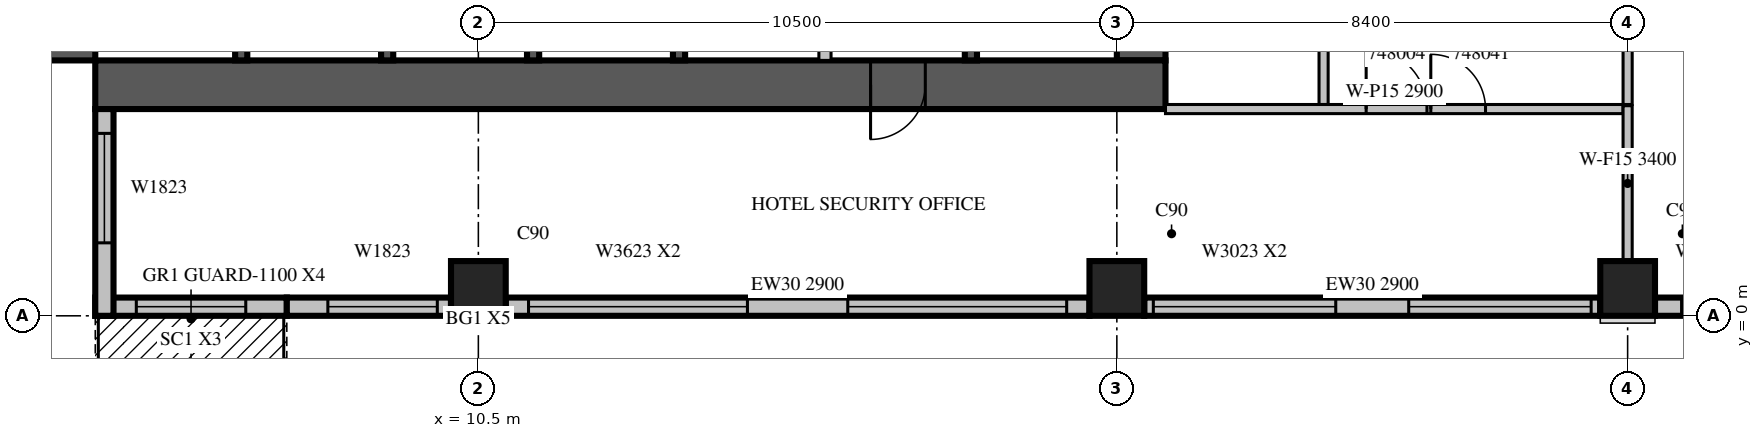
"""IFC4 building model, lengths in metres.
Left out: names, types, materials, properties, quantities, classifications, styles, units other than length and angle.
Written with IfcOpenShell. Run it as: python <this file> out.ifc"""

import sys

from ifc_helpers import new_model, si_unit, direction, frame, frame_2d, origin, origin_2d, place, context, subcontext, project, spatial, rectangle, extrude, source, transform, mapped, element, fill, save


model = new_model("IFC4")
c1 = context("Model", 3, precision=1e-05, world=origin(), true_north=direction((0.0, 1.0)))
c2 = subcontext(c1, "Body", "Model", "MODEL_VIEW")
j1 = project(units=[si_unit("LENGTHUNIT", "METRE"), si_unit("PLANEANGLEUNIT", "RADIAN")], contexts=[c1])
p1 = place(None, origin())
s1 = spatial("IfcSite", under=j1, at=p1, CompositionType="ELEMENT")
p2 = place(p1, origin())
s2 = spatial("IfcBuilding", under=s1, at=p2, CompositionType="ELEMENT")
p3 = place(p2, frame((0.0, 0.0, 215.8)))
s3 = spatial("IfcBuildingStorey", under=s2, at=p3, CompositionType="ELEMENT", Elevation=215.8)
m1 = source(origin(), c2, "Body", "SweptSolid", [
    extrude(rectangle(XDim=0.9, YDim=0.9, at=origin_2d()), origin(), (0.0, 0.0, 1.0), 3.8),
])
for number, where, z_axis, x_axis in (
    (1, (10.5, 0.45, 0.0), (0.0, 0.0, 1.0), (1.0, 0.0, 0.0)),
    (2, (21.0, 0.45, 0.0), (0.0, 0.0, 1.0), (1.0, 0.0, 0.0)),
    (3, (29.4, 0.45, 0.0), (0.0, 0.0, 1.0), (1.0, 0.0, 0.0)),
):
    element("IfcColumn", number, at=place(p3, frame(where, z_axis=z_axis, x_axis=x_axis)), inside=s3, PredefinedType="COLUMN", context=c2, shape_type="MappedRepresentation", body=[
        mapped(m1, transform((0.0, 0.0, 0.0), scale=1.0)),
    ])
m2 = source(origin(), c2, "Body", "SweptSolid", [
    extrude(rectangle(XDim=17.6, YDim=0.8, at=frame_2d((8.8, 0.0))), origin(), (0.0, 0.0, 1.0), 3.8),
])
p4 = place(p3, frame((3.8, 4.2, 0.0), z_axis=(0.0, 0.0, 1.0), x_axis=(0.0, 1.0, 0.0)))
e4 = element("IfcWall", 4, at=p4, inside=s3, PredefinedType="SHEAR", context=c2, shape_type="MappedRepresentation", body=[
    mapped(m2, transform((0.0, 0.0, 0.0), scale=1.0)),
])
m3 = source(origin(), c2, "Body", "SweptSolid", [
    extrude(rectangle(XDim=2.2, YDim=2.1, at=frame_2d((1.1, 1.05))), frame((0.0, 0.41, 0.0), z_axis=(0.0, -1.0, 0.0), x_axis=(1.0, 0.0, 0.0)), (0.0, 0.0, 1.0), 0.82),
])
p5 = place(p4, frame((4.2, 0.0, 0.0)))
e5 = element("IfcOpeningElement", 5, at=p5, cuts=e4, PredefinedType="OPENING", context=c2, shape_type="MappedRepresentation", body=[
    mapped(m3, transform((0.0, 0.0, 0.0), scale=1.0)),
])
m4 = source(origin(), c2, "Body", "SweptSolid", [
    extrude(rectangle(XDim=0.9, YDim=2.1, at=frame_2d((0.45, 1.05))), frame((0.0, 0.41, 0.0), z_axis=(0.0, -1.0, 0.0), x_axis=(1.0, 0.0, 0.0)), (0.0, 0.0, 1.0), 0.82),
])
p6 = place(p4, frame((10.95, 0.0, 0.0)))
e6 = element("IfcOpeningElement", 6, at=p6, cuts=e4, PredefinedType="OPENING", context=c2, shape_type="MappedRepresentation", body=[
    mapped(m4, transform((0.0, 0.0, 0.0), scale=1.0)),
])
m5 = source(origin(), c2, "Body", "SweptSolid", [
    extrude(rectangle(XDim=16.8, YDim=0.8, at=frame_2d((8.4, 0.0))), origin(), (0.0, 0.0, 1.0), 3.8),
])
p7 = place(p3, frame((21.4, 4.2, 0.0), z_axis=(0.0, 0.0, 1.0), x_axis=(0.0, 1.0, 0.0)))
e7 = element("IfcWall", 7, at=p7, inside=s3, PredefinedType="SHEAR", context=c2, shape_type="MappedRepresentation", body=[
    mapped(m5, transform((0.0, 0.0, 0.0), scale=1.0)),
])
p8 = place(p7, frame((4.2, 0.0, 0.0)))
e8 = element("IfcOpeningElement", 8, at=p8, cuts=e7, PredefinedType="OPENING", context=c2, shape_type="MappedRepresentation", body=[
    mapped(m3, transform((0.0, 0.0, 0.0), scale=1.0)),
])
m6 = source(origin(), c2, "Body", "SweptSolid", [
    extrude(rectangle(XDim=1.2, YDim=2.1, at=frame_2d((0.6, 1.05))), frame((0.0, 0.41, 0.0), z_axis=(0.0, -1.0, 0.0), x_axis=(1.0, 0.0, 0.0)), (0.0, 0.0, 1.0), 0.82),
])
p9 = place(p7, frame((14.7, 0.0, 0.0)))
e9 = element("IfcOpeningElement", 9, at=p9, cuts=e7, PredefinedType="OPENING", context=c2, shape_type="MappedRepresentation", body=[
    mapped(m6, transform((0.0, 0.0, 0.0), scale=1.0)),
])
p10 = place(p3, frame((4.2, 3.8, 0.0), z_axis=(0.0, 0.0, 1.0), x_axis=(1.0, 0.0, 0.0)))
e10 = element("IfcWall", 10, at=p10, inside=s3, PredefinedType="SHEAR", context=c2, shape_type="MappedRepresentation", body=[
    mapped(m2, transform((0.0, 0.0, 0.0), scale=1.0)),
])
p11 = place(p10, frame((12.75, 0.0, 0.0)))
e11 = element("IfcOpeningElement", 11, at=p11, cuts=e10, PredefinedType="OPENING", context=c2, shape_type="MappedRepresentation", body=[
    mapped(m4, transform((0.0, 0.0, 0.0), scale=1.0)),
])
m7 = source(origin(), c2, "Body", "SweptSolid", [
    extrude(rectangle(XDim=3.15, YDim=0.3, at=frame_2d((1.575, 0.0))), origin(), (0.0, 0.0, 1.0), 3.4),
])
p12 = place(p3, frame((4.2, 0.15, 0.0), z_axis=(0.0, 0.0, 1.0), x_axis=(1.0, 0.0, 0.0)))
e12 = element("IfcWall", 12, at=p12, inside=s3, PredefinedType="STANDARD", context=c2, shape_type="MappedRepresentation", body=[
    mapped(m7, transform((0.0, 0.0, 0.0), scale=1.0)),
])
m8 = source(origin(), c2, "Body", "SweptSolid", [
    extrude(rectangle(XDim=1.8, YDim=2.4, at=frame_2d((0.9, 1.2))), frame((0.0, 0.16, 0.0), z_axis=(0.0, -1.0, 0.0), x_axis=(1.0, 0.0, 0.0)), (0.0, 0.0, 1.0), 0.32),
])
p13 = place(p12, frame((0.675, 0.0, 0.0)))
e13 = element("IfcOpeningElement", 13, at=p13, cuts=e12, PredefinedType="OPENING", context=c2, shape_type="MappedRepresentation", body=[
    mapped(m8, transform((0.0, 0.0, 0.0), scale=1.0)),
])
m9 = source(origin(), c2, "Body", "SweptSolid", [
    extrude(rectangle(XDim=2.7, YDim=0.3, at=frame_2d((1.35, 0.0))), origin(), (0.0, 0.0, 1.0), 3.4),
])
p14 = place(p3, frame((7.35, 0.15, 0.0), z_axis=(0.0, 0.0, 1.0), x_axis=(1.0, 0.0, 0.0)))
e14 = element("IfcWall", 14, at=p14, inside=s3, PredefinedType="STANDARD", context=c2, shape_type="MappedRepresentation", body=[
    mapped(m9, transform((0.0, 0.0, 0.0), scale=1.0)),
])
m10 = source(origin(), c2, "Body", "SweptSolid", [
    extrude(rectangle(XDim=1.8, YDim=2.3, at=frame_2d((0.9, 1.15))), frame((0.0, 0.16, 0.0), z_axis=(0.0, -1.0, 0.0), x_axis=(1.0, 0.0, 0.0)), (0.0, 0.0, 1.0), 0.32),
])
p15 = place(p14, frame((0.675, 0.0, 0.6)))
e15 = element("IfcOpeningElement", 15, at=p15, cuts=e14, PredefinedType="OPENING", context=c2, shape_type="MappedRepresentation", body=[
    mapped(m10, transform((0.0, 0.0, 0.0), scale=1.0)),
])
m11 = source(origin(), c2, "Body", "SweptSolid", [
    extrude(rectangle(XDim=9.6, YDim=0.3, at=frame_2d((4.8, 0.0))), origin(), (0.0, 0.0, 1.0), 2.9),
])
p16 = place(p3, frame((10.95, 0.15, 0.0), z_axis=(0.0, 0.0, 1.0), x_axis=(1.0, 0.0, 0.0)))
e16 = element("IfcWall", 16, at=p16, inside=s3, PredefinedType="STANDARD", context=c2, shape_type="MappedRepresentation", body=[
    mapped(m11, transform((0.0, 0.0, 0.0), scale=1.0)),
])
m12 = source(origin(), c2, "Body", "SweptSolid", [
    extrude(rectangle(XDim=3.6, YDim=2.3, at=frame_2d((1.8, 1.15))), frame((0.0, 0.16, 0.0), z_axis=(0.0, -1.0, 0.0), x_axis=(1.0, 0.0, 0.0)), (0.0, 0.0, 1.0), 0.32),
])
p17 = place(p16, frame((0.375, 0.0, 0.6)))
e17 = element("IfcOpeningElement", 17, at=p17, cuts=e16, PredefinedType="OPENING", context=c2, shape_type="MappedRepresentation", body=[
    mapped(m12, transform((0.0, 0.0, 0.0), scale=1.0)),
])
p18 = place(p16, frame((5.625, 0.0, 0.6)))
e18 = element("IfcOpeningElement", 18, at=p18, cuts=e16, PredefinedType="OPENING", context=c2, shape_type="MappedRepresentation", body=[
    mapped(m12, transform((0.0, 0.0, 0.0), scale=1.0)),
])
m13 = source(origin(), c2, "Body", "SweptSolid", [
    extrude(rectangle(XDim=7.5, YDim=0.3, at=frame_2d((3.75, 0.0))), origin(), (0.0, 0.0, 1.0), 2.9),
])
p19 = place(p3, frame((21.45, 0.15, 0.0), z_axis=(0.0, 0.0, 1.0), x_axis=(1.0, 0.0, 0.0)))
e19 = element("IfcWall", 19, at=p19, inside=s3, PredefinedType="STANDARD", context=c2, shape_type="MappedRepresentation", body=[
    mapped(m13, transform((0.0, 0.0, 0.0), scale=1.0)),
])
m14 = source(origin(), c2, "Body", "SweptSolid", [
    extrude(rectangle(XDim=3.0, YDim=2.3, at=frame_2d((1.5, 1.15))), frame((0.0, 0.16, 0.0), z_axis=(0.0, -1.0, 0.0), x_axis=(1.0, 0.0, 0.0)), (0.0, 0.0, 1.0), 0.32),
])
p20 = place(p19, frame((0.15, 0.0, 0.6)))
e20 = element("IfcOpeningElement", 20, at=p20, cuts=e19, PredefinedType="OPENING", context=c2, shape_type="MappedRepresentation", body=[
    mapped(m14, transform((0.0, 0.0, 0.0), scale=1.0)),
])
p21 = place(p19, frame((4.35, 0.0, 0.6)))
e21 = element("IfcOpeningElement", 21, at=p21, cuts=e19, PredefinedType="OPENING", context=c2, shape_type="MappedRepresentation", body=[
    mapped(m14, transform((0.0, 0.0, 0.0), scale=1.0)),
])
m15 = source(origin(), c2, "Body", "SweptSolid", [
    extrude(rectangle(XDim=7.5, YDim=0.3, at=frame_2d((3.75, 0.0))), origin(), (0.0, 0.0, 1.0), 3.4),
])
p22 = place(p3, frame((29.85, 0.15, 0.0), z_axis=(0.0, 0.0, 1.0), x_axis=(1.0, 0.0, 0.0)))
e22 = element("IfcWall", 22, at=p22, inside=s3, PredefinedType="STANDARD", context=c2, shape_type="MappedRepresentation", body=[
    mapped(m15, transform((0.0, 0.0, 0.0), scale=1.0)),
])
m16 = source(origin(), c2, "Body", "SweptSolid", [
    extrude(rectangle(XDim=1.2, YDim=2.3, at=frame_2d((0.6, 1.15))), frame((0.0, 0.16, 0.0), z_axis=(0.0, -1.0, 0.0), x_axis=(1.0, 0.0, 0.0)), (0.0, 0.0, 1.0), 0.32),
])
p23 = place(p22, frame((0.438, 0.0, 0.6)))
e23 = element("IfcOpeningElement", 23, at=p23, cuts=e22, PredefinedType="OPENING", context=c2, shape_type="MappedRepresentation", body=[
    mapped(m16, transform((0.0, 0.0, 0.0), scale=1.0)),
])
p24 = place(p22, frame((5.963, 0.0, 0.6)))
e24 = element("IfcOpeningElement", 24, at=p24, cuts=e22, PredefinedType="OPENING", context=c2, shape_type="MappedRepresentation", body=[
    mapped(m16, transform((0.0, 0.0, 0.0), scale=1.0)),
])
m17 = source(origin(), c2, "Body", "SweptSolid", [
    extrude(rectangle(XDim=3.4, YDim=0.3, at=frame_2d((1.7, 0.0))), origin(), (0.0, 0.0, 1.0), 3.4),
])
p25 = place(p3, frame((4.35, 3.4, 0.0), z_axis=(0.0, 0.0, 1.0), x_axis=(0.0, -1.0, 0.0)))
e25 = element("IfcWall", 25, at=p25, inside=s3, PredefinedType="STANDARD", context=c2, shape_type="MappedRepresentation", body=[
    mapped(m17, transform((0.0, 0.0, 0.0), scale=1.0)),
])
p26 = place(p25, frame((0.4, 0.0, 0.6)))
e26 = element("IfcOpeningElement", 26, at=p26, cuts=e25, PredefinedType="OPENING", context=c2, shape_type="MappedRepresentation", body=[
    mapped(m10, transform((0.0, 0.0, 0.0), scale=1.0)),
])
m18 = source(origin(), c2, "Body", "SweptSolid", [
    extrude(rectangle(XDim=3.1, YDim=0.2, at=frame_2d((1.55, 0.0))), origin(), (0.0, 0.0, 1.0), 3.8),
])
for number, where, z_axis, x_axis in (
    (27, (6.6, 4.2, 0.0), (0.0, 0.0, 1.0), (0.0, 1.0, 0.0)),
    (28, (9.0, 4.2, 0.0), (0.0, 0.0, 1.0), (0.0, 1.0, 0.0)),
    (29, (11.4, 4.2, 0.0), (0.0, 0.0, 1.0), (0.0, 1.0, 0.0)),
):
    element("IfcWall", number, at=place(p3, frame(where, z_axis=z_axis, x_axis=x_axis)), inside=s3, PredefinedType="SOLIDWALL", context=c2, shape_type="MappedRepresentation", body=[
        mapped(m18, transform((0.0, 0.0, 0.0), scale=1.0)),
    ])
m19 = source(origin(), c2, "Body", "SweptSolid", [
    extrude(rectangle(XDim=3.1, YDim=0.2, at=frame_2d((1.55, 0.0))), origin(), (0.0, 0.0, 1.0), 3.4),
])
for number, where, z_axis, x_axis in (
    (30, (13.8, 4.2, 0.0), (0.0, 0.0, 1.0), (0.0, 1.0, 0.0)),
    (31, (18.6, 4.2, 0.0), (0.0, 0.0, 1.0), (0.0, 1.0, 0.0)),
):
    element("IfcWall", number, at=place(p3, frame(where, z_axis=z_axis, x_axis=x_axis)), inside=s3, PredefinedType="SOLIDWALL", context=c2, shape_type="MappedRepresentation", body=[
        mapped(m19, transform((0.0, 0.0, 0.0), scale=1.0)),
    ])
m20 = source(origin(), c2, "Body", "SweptSolid", [
    extrude(rectangle(XDim=3.1, YDim=0.2, at=frame_2d((1.55, 0.0))), origin(), (0.0, 0.0, 1.0), 3.4),
])
p27 = place(p3, frame((16.2, 4.2, 0.0), z_axis=(0.0, 0.0, 1.0), x_axis=(0.0, 1.0, 0.0)))
e32 = element("IfcWall", 32, at=p27, inside=s3, PredefinedType="PARTITIONING", context=c2, shape_type="MappedRepresentation", body=[
    mapped(m20, transform((0.0, 0.0, 0.0), scale=1.0)),
])
m21 = source(origin(), c2, "Body", "SweptSolid", [
    extrude(rectangle(XDim=11.225, YDim=0.15, at=frame_2d((5.612, 0.0))), origin(), (0.0, 0.0, 1.0), 2.4),
])
p28 = place(p3, frame((24.4, 14.7, 0.0), z_axis=(0.0, 0.0, 1.0), x_axis=(0.0, -1.0, 0.0)))
e33 = element("IfcWall", 33, at=p28, inside=s3, PredefinedType="PARTITIONING", context=c2, shape_type="MappedRepresentation", body=[
    mapped(m21, transform((0.0, 0.0, 0.0), scale=1.0)),
])
m22 = source(origin(), c2, "Body", "SweptSolid", [
    extrude(rectangle(XDim=0.9, YDim=2.1, at=frame_2d((0.45, 1.05))), frame((0.0, 0.085, 0.0), z_axis=(0.0, -1.0, 0.0), x_axis=(1.0, 0.0, 0.0)), (0.0, 0.0, 1.0), 0.17),
])
p29 = place(p28, frame((9.062, 0.0, 0.0)))
e34 = element("IfcOpeningElement", 34, at=p29, cuts=e33, PredefinedType="OPENING", context=c2, shape_type="MappedRepresentation", body=[
    mapped(m22, transform((0.0, 0.0, 0.0), scale=1.0)),
])
p30 = place(p28, frame((2.575, 0.0, 0.0)))
e35 = element("IfcOpeningElement", 35, at=p30, cuts=e33, PredefinedType="OPENING", context=c2, shape_type="MappedRepresentation", body=[
    mapped(m22, transform((0.0, 0.0, 0.0), scale=1.0)),
])
m23 = source(origin(), c2, "Body", "SweptSolid", [
    extrude(rectangle(XDim=6.576, YDim=0.15, at=frame_2d((3.288, 0.0))), origin(), (0.0, 0.0, 1.0), 3.4),
])
p31 = place(p3, frame((29.4, 3.475, 0.0), z_axis=(0.0, 0.0, 1.0), x_axis=(0.0, 1.0, 0.0)))
e36 = element("IfcWall", 36, at=p31, inside=s3, PredefinedType="PARTITIONING", context=c2, shape_type="MappedRepresentation", body=[
    mapped(m23, transform((0.0, 0.0, 0.0), scale=1.0)),
])
m24 = source(origin(), c2, "Body", "SweptSolid", [
    extrude(rectangle(XDim=7.525, YDim=0.15, at=frame_2d((3.763, 0.0))), origin(), (0.0, 0.0, 1.0), 2.9),
])
p32 = place(p3, frame((21.8, 3.4, 0.0), z_axis=(0.0, 0.0, 1.0), x_axis=(1.0, 0.0, 0.0)))
e37 = element("IfcWall", 37, at=p32, inside=s3, PredefinedType="PARTITIONING", context=c2, shape_type="MappedRepresentation", body=[
    mapped(m24, transform((0.0, 0.0, 0.0), scale=1.0)),
])
m25 = source(origin(), c2, "Body", "SweptSolid", [
    extrude(rectangle(XDim=1.0, YDim=2.1, at=frame_2d((0.5, 1.05))), frame((0.0, 0.085, 0.0), z_axis=(0.0, -1.0, 0.0), x_axis=(1.0, 0.0, 0.0)), (0.0, 0.0, 1.0), 0.17),
])
p33 = place(p32, frame((3.3, 0.0, 0.0)))
e38 = element("IfcOpeningElement", 38, at=p33, cuts=e37, PredefinedType="OPENING", context=c2, shape_type="MappedRepresentation", body=[
    mapped(m25, transform((0.0, 0.0, 0.0), scale=1.0)),
])
p34 = place(p32, frame((4.363, 0.0, 0.0)))
e39 = element("IfcOpeningElement", 39, at=p34, cuts=e37, PredefinedType="OPENING", context=c2, shape_type="MappedRepresentation", body=[
    mapped(m22, transform((0.0, 0.0, 0.0), scale=1.0)),
])
m26 = source(origin(), c2, "Body", "SweptSolid", [
    extrude(rectangle(XDim=2.556, YDim=0.15, at=frame_2d((1.278, 0.0))), origin(), (0.0, 0.0, 1.0), 3.4),
])
p35 = place(p3, frame((29.4, 0.899, 0.0), z_axis=(0.0, 0.0, 1.0), x_axis=(0.0, 1.0, 0.0)))
e40 = element("IfcWall", 40, at=p35, inside=s3, PredefinedType="PARTITIONING", context=c2, shape_type="MappedRepresentation", body=[
    mapped(m26, transform((0.0, 0.0, 0.0), scale=1.0)),
])
m27 = source(origin(), c2, "Body", "SweptSolid", [
    extrude(rectangle(XDim=1.8, YDim=2.4, at=frame_2d((0.9, 1.2))), frame((0.0, 0.025, 0.0), z_axis=(0.0, -1.0, 0.0), x_axis=(1.0, 0.0, 0.0)), (0.0, 0.0, 1.0), 0.05),
])
p36 = place(p13, origin())
e41 = element("IfcDoor", 41, at=p36, inside=s3, OperationType="SLIDING_TO_LEFT", PredefinedType="DOOR", context=c2, shape_type="MappedRepresentation", body=[
    mapped(m27, transform((0.0, 0.0, 0.0), scale=1.0)),
])
fill(e13, e41)
m28 = source(origin(), c2, "Body", "SweptSolid", [
    extrude(rectangle(XDim=1.8, YDim=2.3, at=frame_2d((0.9, 1.15))), frame((0.0, 0.03, 0.0), z_axis=(0.0, -1.0, 0.0), x_axis=(1.0, 0.0, 0.0)), (0.0, 0.0, 1.0), 0.06),
])
p37 = place(p15, origin())
e42 = element("IfcWindow", 42, at=p37, inside=s3, PartitioningType="SINGLE_PANEL", PredefinedType="WINDOW", context=c2, shape_type="MappedRepresentation", body=[
    mapped(m28, transform((0.0, 0.0, 0.0), scale=1.0)),
])
fill(e15, e42)
m29 = source(origin(), c2, "Body", "SweptSolid", [
    extrude(rectangle(XDim=3.6, YDim=2.3, at=frame_2d((1.8, 1.15))), frame((0.0, 0.03, 0.0), z_axis=(0.0, -1.0, 0.0), x_axis=(1.0, 0.0, 0.0)), (0.0, 0.0, 1.0), 0.06),
])
p38 = place(p17, origin())
e43 = element("IfcWindow", 43, at=p38, inside=s3, PartitioningType="SINGLE_PANEL", PredefinedType="WINDOW", context=c2, shape_type="MappedRepresentation", body=[
    mapped(m29, transform((0.0, 0.0, 0.0), scale=1.0)),
])
fill(e17, e43)
p39 = place(p18, origin())
e44 = element("IfcWindow", 44, at=p39, inside=s3, PartitioningType="SINGLE_PANEL", PredefinedType="WINDOW", context=c2, shape_type="MappedRepresentation", body=[
    mapped(m29, transform((0.0, 0.0, 0.0), scale=1.0)),
])
fill(e18, e44)
m30 = source(origin(), c2, "Body", "SweptSolid", [
    extrude(rectangle(XDim=3.0, YDim=2.3, at=frame_2d((1.5, 1.15))), frame((0.0, 0.03, 0.0), z_axis=(0.0, -1.0, 0.0), x_axis=(1.0, 0.0, 0.0)), (0.0, 0.0, 1.0), 0.06),
])
p40 = place(p20, origin())
e45 = element("IfcWindow", 45, at=p40, inside=s3, PartitioningType="SINGLE_PANEL", PredefinedType="WINDOW", context=c2, shape_type="MappedRepresentation", body=[
    mapped(m30, transform((0.0, 0.0, 0.0), scale=1.0)),
])
fill(e20, e45)
p41 = place(p21, origin())
e46 = element("IfcWindow", 46, at=p41, inside=s3, PartitioningType="SINGLE_PANEL", PredefinedType="WINDOW", context=c2, shape_type="MappedRepresentation", body=[
    mapped(m30, transform((0.0, 0.0, 0.0), scale=1.0)),
])
fill(e21, e46)
m31 = source(origin(), c2, "Body", "SweptSolid", [
    extrude(rectangle(XDim=1.2, YDim=2.3, at=frame_2d((0.6, 1.15))), frame((0.0, 0.03, 0.0), z_axis=(0.0, -1.0, 0.0), x_axis=(1.0, 0.0, 0.0)), (0.0, 0.0, 1.0), 0.06),
])
p42 = place(p23, origin())
e47 = element("IfcWindow", 47, at=p42, inside=s3, PartitioningType="SINGLE_PANEL", PredefinedType="WINDOW", context=c2, shape_type="MappedRepresentation", body=[
    mapped(m31, transform((0.0, 0.0, 0.0), scale=1.0)),
])
fill(e23, e47)
p43 = place(p26, origin())
e48 = element("IfcWindow", 48, at=p43, inside=s3, PartitioningType="SINGLE_PANEL", PredefinedType="WINDOW", context=c2, shape_type="MappedRepresentation", body=[
    mapped(m28, transform((0.0, 0.0, 0.0), scale=1.0)),
])
fill(e26, e48)
m32 = source(origin(), c2, "Body", "SweptSolid", [
    extrude(rectangle(XDim=0.9, YDim=2.1, at=frame_2d((0.45, 1.05))), frame((0.0, 0.025, 0.0), z_axis=(0.0, -1.0, 0.0), x_axis=(1.0, 0.0, 0.0)), (0.0, 0.0, 1.0), 0.05),
])
p44 = place(p11, origin())
e49 = element("IfcDoor", 49, at=p44, inside=s3, OperationType="SINGLE_SWING_RIGHT", PredefinedType="DOOR", context=c2, shape_type="MappedRepresentation", body=[
    mapped(m32, transform((0.0, 0.0, 0.0), scale=1.0)),
])
fill(e11, e49)
m33 = source(origin(), c2, "Body", "SweptSolid", [
    extrude(rectangle(XDim=1.0, YDim=2.1, at=frame_2d((0.5, 1.05))), frame((0.0, 0.025, 0.0), z_axis=(0.0, -1.0, 0.0), x_axis=(1.0, 0.0, 0.0)), (0.0, 0.0, 1.0), 0.05),
])
p45 = place(p33, origin())
e50 = element("IfcDoor", 50, at=p45, inside=s3, OperationType="SINGLE_SWING_LEFT", PredefinedType="DOOR", context=c2, shape_type="MappedRepresentation", body=[
    mapped(m33, transform((0.0, 0.0, 0.0), scale=1.0)),
])
fill(e38, e50)
p46 = place(p34, origin())
e51 = element("IfcDoor", 51, at=p46, inside=s3, OperationType="SINGLE_SWING_LEFT", PredefinedType="DOOR", context=c2, shape_type="MappedRepresentation", body=[
    mapped(m32, transform((0.0, 0.0, 0.0), scale=1.0)),
])
fill(e39, e51)
save(model, sys.argv[1])
